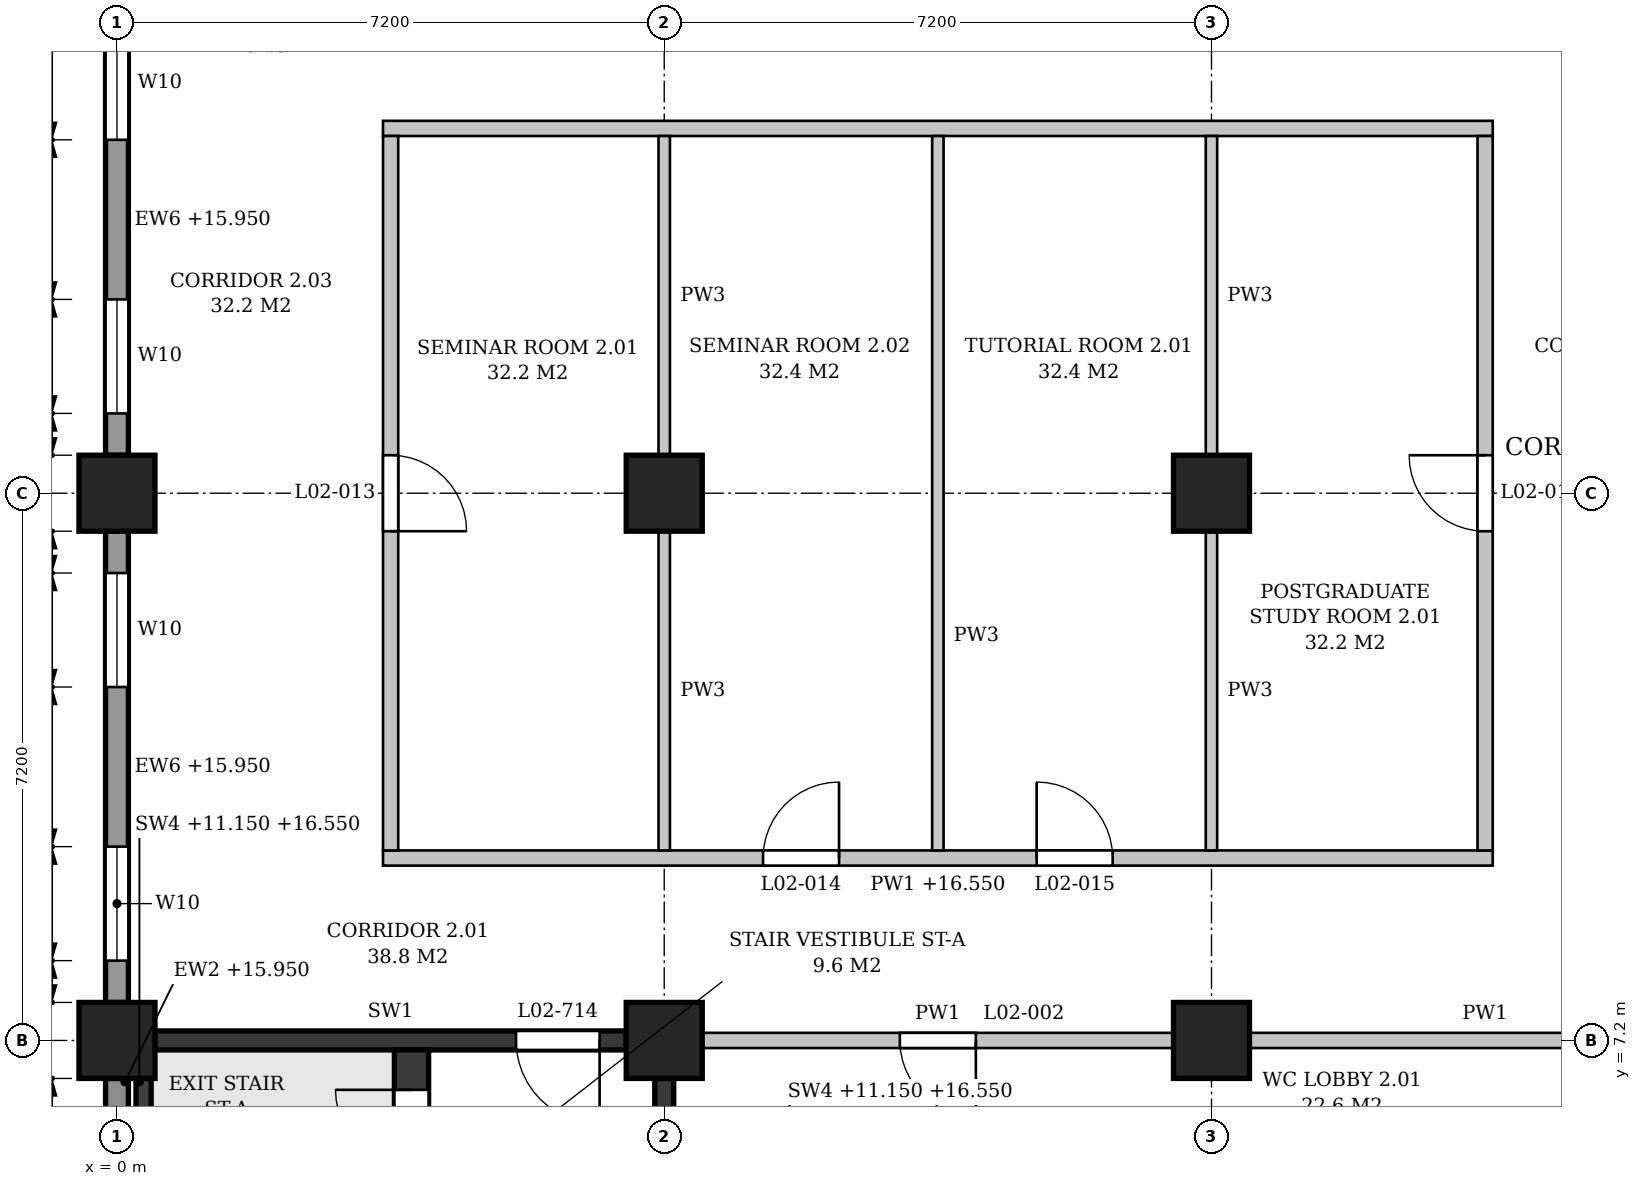
"""IFC4 building model, lengths in metres.
Left out: names, types, materials, properties, quantities, classifications, styles, units other than length and angle.
Written with IfcOpenShell. Run it as: python <this file> out.ifc"""

import sys

from ifc_helpers import new_model, si_unit, direction, frame, frame_2d, origin, origin_2d, place, context, subcontext, project, spatial, polyline, rectangle, outline, extrude, element, fill, save


model = new_model("IFC4")
c1 = context("Model", 3, precision=1e-05, world=origin(), true_north=direction((0.0, 1.0)))
c2 = subcontext(c1, "Body", "Model", "MODEL_VIEW")
j1 = project(units=[si_unit("LENGTHUNIT", "METRE"), si_unit("PLANEANGLEUNIT", "RADIAN")], contexts=[c1])
p1 = place(None, origin())
s1 = spatial("IfcSite", under=j1, at=p1, CompositionType="ELEMENT")
p2 = place(p1, origin())
s2 = spatial("IfcBuilding", under=s1, at=p2, CompositionType="ELEMENT")
p3 = place(p2, frame((0.0, 0.0, 11.4)))
s3 = spatial("IfcBuildingStorey", under=s2, at=p3, CompositionType="ELEMENT", Elevation=11.4)
for number, where, z_axis, x_axis in (
    (1, (0.0, 7.2, 0.0), (0.0, 0.0, 1.0), (1.0, 0.0, 0.0)),
    (2, (0.0, 14.4, 0.0), (0.0, 0.0, 1.0), (1.0, 0.0, 0.0)),
    (3, (7.2, 7.2, 0.0), (0.0, 0.0, 1.0), (1.0, 0.0, 0.0)),
    (4, (7.2, 14.4, 0.0), (0.0, 0.0, 1.0), (1.0, 0.0, 0.0)),
    (5, (14.4, 7.2, 0.0), (0.0, 0.0, 1.0), (1.0, 0.0, 0.0)),
    (6, (14.4, 14.4, 0.0), (0.0, 0.0, 1.0), (1.0, 0.0, 0.0)),
):
    element("IfcColumn", number, at=place(p3, frame(where, z_axis=z_axis, x_axis=x_axis)), inside=s3, PredefinedType="COLUMN", context=c2, shape_type="SweptSolid", body=[
        extrude(rectangle(XDim=1.0, YDim=1.0, at=origin_2d()), origin(), (0.0, 0.0, 1.0), 5.4),
    ])
p4 = place(p3, frame((0.0, 0.5, 0.0), z_axis=(0.0, 0.0, 1.0), x_axis=(0.0, 1.0, 0.0)))
e7 = element("IfcWall", 7, at=p4, inside=s3, PredefinedType="STANDARD", context=c2, shape_type="SweptSolid", body=[
    extrude(rectangle(XDim=6.2, YDim=0.3, at=frame_2d((3.1, 0.0))), origin(), (0.0, 0.0, 1.0), 4.55),
])
p5 = place(p4, frame((0.85, 0.0, 0.9)))
e8 = element("IfcOpeningElement", 8, at=p5, cuts=e7, PredefinedType="OPENING", context=c2, shape_type="SweptSolid", body=[
    extrude(outline(polyline([(0.0, 0.0), (0.9, 0.0), (0.9, 2.65), (0.45, 3.1), (0.0, 2.65), (0.0, 0.0)])), frame((0.0, 0.16, 0.0), z_axis=(0.0, -1.0, 0.0), x_axis=(1.0, 0.0, 0.0)), (0.0, 0.0, 1.0), 0.32),
])
p6 = place(p4, frame((4.45, 0.0, 0.9)))
e9 = element("IfcOpeningElement", 9, at=p6, cuts=e7, PredefinedType="OPENING", context=c2, shape_type="SweptSolid", body=[
    extrude(outline(polyline([(0.0, 0.0), (0.9, 0.0), (0.9, 2.65), (0.45, 3.1), (0.0, 2.65), (0.0, 0.0)])), frame((0.0, 0.16, 0.0), z_axis=(0.0, -1.0, 0.0), x_axis=(1.0, 0.0, 0.0)), (0.0, 0.0, 1.0), 0.32),
])
p7 = place(p3, frame((0.0, 7.7, 0.0), z_axis=(0.0, 0.0, 1.0), x_axis=(0.0, 1.0, 0.0)))
e10 = element("IfcWall", 10, at=p7, inside=s3, PredefinedType="STANDARD", context=c2, shape_type="SweptSolid", body=[
    extrude(rectangle(XDim=6.2, YDim=0.3, at=frame_2d((3.1, 0.0))), origin(), (0.0, 0.0, 1.0), 4.55),
])
p8 = place(p7, frame((0.55, 0.0, 0.9)))
e11 = element("IfcOpeningElement", 11, at=p8, cuts=e10, PredefinedType="OPENING", context=c2, shape_type="SweptSolid", body=[
    extrude(outline(polyline([(0.0, 0.0), (1.5, 0.0), (1.5, 2.35), (0.75, 3.1), (0.0, 2.35), (0.0, 0.0)])), frame((0.0, 0.16, 0.0), z_axis=(0.0, -1.0, 0.0), x_axis=(1.0, 0.0, 0.0)), (0.0, 0.0, 1.0), 0.32),
])
p9 = place(p7, frame((4.15, 0.0, 0.9)))
e12 = element("IfcOpeningElement", 12, at=p9, cuts=e10, PredefinedType="OPENING", context=c2, shape_type="SweptSolid", body=[
    extrude(outline(polyline([(0.0, 0.0), (1.5, 0.0), (1.5, 2.35), (0.75, 3.1), (0.0, 2.35), (0.0, 0.0)])), frame((0.0, 0.16, 0.0), z_axis=(0.0, -1.0, 0.0), x_axis=(1.0, 0.0, 0.0)), (0.0, 0.0, 1.0), 0.32),
])
p10 = place(p3, frame((0.0, 14.9, 0.0), z_axis=(0.0, 0.0, 1.0), x_axis=(0.0, 1.0, 0.0)))
e13 = element("IfcWall", 13, at=p10, inside=s3, PredefinedType="STANDARD", context=c2, shape_type="SweptSolid", body=[
    extrude(rectangle(XDim=6.2, YDim=0.3, at=frame_2d((3.1, 0.0))), origin(), (0.0, 0.0, 1.0), 4.55),
])
p11 = place(p10, frame((0.55, 0.0, 0.9)))
e14 = element("IfcOpeningElement", 14, at=p11, cuts=e13, PredefinedType="OPENING", context=c2, shape_type="SweptSolid", body=[
    extrude(outline(polyline([(0.0, 0.0), (1.5, 0.0), (1.5, 2.35), (0.75, 3.1), (0.0, 2.35), (0.0, 0.0)])), frame((0.0, 0.16, 0.0), z_axis=(0.0, -1.0, 0.0), x_axis=(1.0, 0.0, 0.0)), (0.0, 0.0, 1.0), 0.32),
])
p12 = place(p10, frame((4.15, 0.0, 0.9)))
e15 = element("IfcOpeningElement", 15, at=p12, cuts=e13, PredefinedType="OPENING", context=c2, shape_type="SweptSolid", body=[
    extrude(outline(polyline([(0.0, 0.0), (1.5, 0.0), (1.5, 2.35), (0.75, 3.1), (0.0, 2.35), (0.0, 0.0)])), frame((0.0, 0.16, 0.0), z_axis=(0.0, -1.0, 0.0), x_axis=(1.0, 0.0, 0.0)), (0.0, 0.0, 1.0), 0.32),
])
p13 = place(p3, frame((0.5, 7.2, 0.0), z_axis=(0.0, 0.0, 1.0), x_axis=(1.0, 0.0, 0.0)))
e16 = element("IfcWall", 16, at=p13, inside=s3, PredefinedType="SHEAR", context=c2, shape_type="SweptSolid", body=[
    extrude(rectangle(XDim=6.2, YDim=0.25, at=frame_2d((3.1, 0.0))), origin(), (0.0, 0.0, 1.0), 4.4),
])
p14 = place(p13, frame((4.75, 0.0, 0.0)))
e17 = element("IfcOpeningElement", 17, at=p14, cuts=e16, PredefinedType="OPENING", context=c2, shape_type="SweptSolid", body=[
    extrude(rectangle(XDim=1.1, YDim=2.1, at=frame_2d((0.55, 1.05))), frame((0.0, 0.135, 0.0), z_axis=(0.0, -1.0, 0.0), x_axis=(1.0, 0.0, 0.0)), (0.0, 0.0, 1.0), 0.27),
])
p15 = place(p3, frame((7.2, 0.5, 0.0), z_axis=(0.0, 0.0, 1.0), x_axis=(0.0, 1.0, 0.0)))
e18 = element("IfcWall", 18, at=p15, inside=s3, PredefinedType="SHEAR", context=c2, shape_type="SweptSolid", body=[
    extrude(rectangle(XDim=6.2, YDim=0.25, at=frame_2d((3.1, 0.0))), origin(), (0.0, 0.0, 1.0), 4.4),
])
p16 = place(p3, frame((0.35, 5.85, -0.25), z_axis=(0.0, 0.0, 1.0), x_axis=(0.0, 1.0, 0.0)))
e19 = element("IfcWall", 19, at=p16, inside=s3, PredefinedType="SHEAR", context=c2, shape_type="SweptSolid", body=[
    extrude(rectangle(XDim=0.85, YDim=0.2, at=frame_2d((0.425, 0.0))), origin(), (0.0, 0.0, 1.0), 5.4),
])
p17 = place(p3, frame((3.875, 0.225, 0.0), z_axis=(0.0, 0.0, 1.0), x_axis=(0.0, 1.0, 0.0)))
e20 = element("IfcWall", 20, at=p17, inside=s3, PredefinedType="SHEAR", context=c2, shape_type="SweptSolid", body=[
    extrude(rectangle(XDim=6.85, YDim=0.45, at=frame_2d((3.425, 0.0))), origin(), (0.0, 0.0, 1.0), 5.15),
])
p18 = place(p17, frame((5.325, 0.0, 0.0)))
e21 = element("IfcOpeningElement", 21, at=p18, cuts=e20, PredefinedType="OPENING", context=c2, shape_type="SweptSolid", body=[
    extrude(rectangle(XDim=1.0, YDim=2.1, at=frame_2d((0.5, 1.05))), frame((0.0, 0.235, 0.0), z_axis=(0.0, -1.0, 0.0), x_axis=(1.0, 0.0, 0.0)), (0.0, 0.0, 1.0), 0.47),
])
p19 = place(p3, frame((7.7, 7.2, 0.0), z_axis=(0.0, 0.0, 1.0), x_axis=(1.0, 0.0, 0.0)))
e22 = element("IfcWall", 22, at=p19, inside=s3, PredefinedType="PARTITIONING", context=c2, shape_type="SweptSolid", body=[
    extrude(rectangle(XDim=6.2, YDim=0.2, at=frame_2d((3.1, 0.0))), origin(), (0.0, 0.0, 1.0), 4.4),
])
p20 = place(p19, frame((2.6, 0.0, 0.0)))
e23 = element("IfcOpeningElement", 23, at=p20, cuts=e22, PredefinedType="OPENING", context=c2, shape_type="SweptSolid", body=[
    extrude(rectangle(XDim=1.0, YDim=2.1, at=frame_2d((0.5, 1.05))), frame((0.0, 0.11, 0.0), z_axis=(0.0, -1.0, 0.0), x_axis=(1.0, 0.0, 0.0)), (0.0, 0.0, 1.0), 0.22),
])
p21 = place(p3, frame((14.9, 7.2, 0.0), z_axis=(0.0, 0.0, 1.0), x_axis=(1.0, 0.0, 0.0)))
e24 = element("IfcWall", 24, at=p21, inside=s3, PredefinedType="PARTITIONING", context=c2, shape_type="SweptSolid", body=[
    extrude(rectangle(XDim=6.2, YDim=0.2, at=frame_2d((3.1, 0.0))), origin(), (0.0, 0.0, 1.0), 4.4),
])
p22 = place(p21, frame((4.15, 0.0, 0.0)))
e25 = element("IfcOpeningElement", 25, at=p22, cuts=e24, PredefinedType="OPENING", context=c2, shape_type="SweptSolid", body=[
    extrude(rectangle(XDim=1.0, YDim=2.1, at=frame_2d((0.5, 1.05))), frame((0.0, 0.11, 0.0), z_axis=(0.0, -1.0, 0.0), x_axis=(1.0, 0.0, 0.0)), (0.0, 0.0, 1.0), 0.22),
])
p23 = place(p3, frame((3.5, 9.6, 0.0), z_axis=(0.0, 0.0, 1.0), x_axis=(1.0, 0.0, 0.0)))
e26 = element("IfcWall", 26, at=p23, inside=s3, PredefinedType="PARTITIONING", context=c2, shape_type="SweptSolid", body=[
    extrude(outline(polyline([(0.0, 0.0), (14.6, 0.0), (14.6, 5.15), (11.15, 5.15), (11.15, 4.4), (10.65, 4.4), (10.65, 5.15), (3.95, 5.15), (3.95, 4.4), (3.45, 4.4), (3.45, 5.15), (0.0, 5.15), (0.0, 0.0)])), frame((0.0, 0.1, 0.0), z_axis=(0.0, -1.0, 0.0), x_axis=(1.0, 0.0, 0.0)), (0.0, 0.0, 1.0), 0.2),
])
p24 = place(p23, frame((5.0, 0.0, 0.0)))
e27 = element("IfcOpeningElement", 27, at=p24, cuts=e26, PredefinedType="OPENING", context=c2, shape_type="SweptSolid", body=[
    extrude(rectangle(XDim=1.0, YDim=2.1, at=frame_2d((0.5, 1.05))), frame((0.0, 0.11, 0.0), z_axis=(0.0, -1.0, 0.0), x_axis=(1.0, 0.0, 0.0)), (0.0, 0.0, 1.0), 0.22),
])
p25 = place(p23, frame((8.6, 0.0, 0.0)))
e28 = element("IfcOpeningElement", 28, at=p25, cuts=e26, PredefinedType="OPENING", context=c2, shape_type="SweptSolid", body=[
    extrude(rectangle(XDim=1.0, YDim=2.1, at=frame_2d((0.5, 1.05))), frame((0.0, 0.11, 0.0), z_axis=(0.0, -1.0, 0.0), x_axis=(1.0, 0.0, 0.0)), (0.0, 0.0, 1.0), 0.22),
])
p26 = place(p3, frame((3.5, 19.2, 0.0), z_axis=(0.0, 0.0, 1.0), x_axis=(1.0, 0.0, 0.0)))
e29 = element("IfcWall", 29, at=p26, inside=s3, PredefinedType="PARTITIONING", context=c2, shape_type="SweptSolid", body=[
    extrude(outline(polyline([(0.0, 0.0), (14.6, 0.0), (14.6, 5.15), (11.15, 5.15), (11.15, 4.4), (10.65, 4.4), (10.65, 5.15), (3.95, 5.15), (3.95, 4.4), (3.45, 4.4), (3.45, 5.15), (0.0, 5.15), (0.0, 0.0)])), frame((0.0, 0.1, 0.0), z_axis=(0.0, -1.0, 0.0), x_axis=(1.0, 0.0, 0.0)), (0.0, 0.0, 1.0), 0.2),
])
p27 = place(p3, frame((3.6, 9.7, 0.0), z_axis=(0.0, 0.0, 1.0), x_axis=(0.0, 1.0, 0.0)))
e30 = element("IfcWall", 30, at=p27, inside=s3, PredefinedType="PARTITIONING", context=c2, shape_type="SweptSolid", body=[
    extrude(outline(polyline([(0.0, 0.0), (9.4, 0.0), (9.4, 5.15), (4.95, 5.15), (4.95, 4.4), (4.45, 4.4), (4.45, 5.15), (0.0, 5.15), (0.0, 0.0)])), frame((0.0, 0.1, 0.0), z_axis=(0.0, -1.0, 0.0), x_axis=(1.0, 0.0, 0.0)), (0.0, 0.0, 1.0), 0.2),
])
p28 = place(p27, frame((4.2, 0.0, 0.0)))
e31 = element("IfcOpeningElement", 31, at=p28, cuts=e30, PredefinedType="OPENING", context=c2, shape_type="SweptSolid", body=[
    extrude(rectangle(XDim=1.0, YDim=2.1, at=frame_2d((0.5, 1.05))), frame((0.0, 0.11, 0.0), z_axis=(0.0, -1.0, 0.0), x_axis=(1.0, 0.0, 0.0)), (0.0, 0.0, 1.0), 0.22),
])
p29 = place(p3, frame((7.2, 9.7, 0.0), z_axis=(0.0, 0.0, 1.0), x_axis=(0.0, 1.0, 0.0)))
e32 = element("IfcWall", 32, at=p29, inside=s3, PredefinedType="PARTITIONING", context=c2, shape_type="SweptSolid", body=[
    extrude(rectangle(XDim=4.2, YDim=0.15, at=frame_2d((2.1, 0.0))), origin(), (0.0, 0.0, 1.0), 4.4),
])
p30 = place(p3, frame((7.2, 14.9, 0.0), z_axis=(0.0, 0.0, 1.0), x_axis=(0.0, 1.0, 0.0)))
e33 = element("IfcWall", 33, at=p30, inside=s3, PredefinedType="PARTITIONING", context=c2, shape_type="SweptSolid", body=[
    extrude(rectangle(XDim=4.2, YDim=0.15, at=frame_2d((2.1, 0.0))), origin(), (0.0, 0.0, 1.0), 4.4),
])
p31 = place(p3, frame((10.8, 9.7, 0.0), z_axis=(0.0, 0.0, 1.0), x_axis=(0.0, 1.0, 0.0)))
e34 = element("IfcWall", 34, at=p31, inside=s3, PredefinedType="PARTITIONING", context=c2, shape_type="SweptSolid", body=[
    extrude(rectangle(XDim=9.4, YDim=0.15, at=frame_2d((4.7, 0.0))), origin(), (0.0, 0.0, 1.0), 4.4),
])
p32 = place(p3, frame((14.4, 9.7, 0.0), z_axis=(0.0, 0.0, 1.0), x_axis=(0.0, 1.0, 0.0)))
e35 = element("IfcWall", 35, at=p32, inside=s3, PredefinedType="PARTITIONING", context=c2, shape_type="SweptSolid", body=[
    extrude(rectangle(XDim=4.2, YDim=0.15, at=frame_2d((2.1, 0.0))), origin(), (0.0, 0.0, 1.0), 4.4),
])
p33 = place(p3, frame((14.4, 14.9, 0.0), z_axis=(0.0, 0.0, 1.0), x_axis=(0.0, 1.0, 0.0)))
e36 = element("IfcWall", 36, at=p33, inside=s3, PredefinedType="PARTITIONING", context=c2, shape_type="SweptSolid", body=[
    extrude(rectangle(XDim=4.2, YDim=0.15, at=frame_2d((2.1, 0.0))), origin(), (0.0, 0.0, 1.0), 4.4),
])
p34 = place(p3, frame((18.0, 9.7, 0.0), z_axis=(0.0, 0.0, 1.0), x_axis=(0.0, 1.0, 0.0)))
e37 = element("IfcWall", 37, at=p34, inside=s3, PredefinedType="PARTITIONING", context=c2, shape_type="SweptSolid", body=[
    extrude(outline(polyline([(0.0, 0.0), (9.4, 0.0), (9.4, 5.15), (4.95, 5.15), (4.95, 4.4), (4.45, 4.4), (4.45, 5.15), (0.0, 5.15), (0.0, 0.0)])), frame((0.0, 0.1, 0.0), z_axis=(0.0, -1.0, 0.0), x_axis=(1.0, 0.0, 0.0)), (0.0, 0.0, 1.0), 0.2),
])
p35 = place(p34, frame((4.2, 0.0, 0.0)))
e38 = element("IfcOpeningElement", 38, at=p35, cuts=e37, PredefinedType="OPENING", context=c2, shape_type="SweptSolid", body=[
    extrude(rectangle(XDim=1.0, YDim=2.1, at=frame_2d((0.5, 1.05))), frame((0.0, 0.11, 0.0), z_axis=(0.0, -1.0, 0.0), x_axis=(1.0, 0.0, 0.0)), (0.0, 0.0, 1.0), 0.22),
])
p36 = place(p8, origin())
e39 = element("IfcWindow", 39, at=p36, inside=s3, PartitioningType="SINGLE_PANEL", PredefinedType="WINDOW", context=c2, shape_type="SweptSolid", body=[
    extrude(outline(polyline([(0.0, 0.0), (1.5, 0.0), (1.5, 2.35), (0.75, 3.1), (0.0, 2.35), (0.0, 0.0)])), frame((0.0, 0.03, 0.0), z_axis=(0.0, -1.0, 0.0), x_axis=(1.0, 0.0, 0.0)), (0.0, 0.0, 1.0), 0.06),
])
fill(e11, e39)
p37 = place(p9, origin())
e40 = element("IfcWindow", 40, at=p37, inside=s3, PartitioningType="SINGLE_PANEL", PredefinedType="WINDOW", context=c2, shape_type="SweptSolid", body=[
    extrude(outline(polyline([(0.0, 0.0), (1.5, 0.0), (1.5, 2.35), (0.75, 3.1), (0.0, 2.35), (0.0, 0.0)])), frame((0.0, 0.03, 0.0), z_axis=(0.0, -1.0, 0.0), x_axis=(1.0, 0.0, 0.0)), (0.0, 0.0, 1.0), 0.06),
])
fill(e12, e40)
p38 = place(p11, origin())
e41 = element("IfcWindow", 41, at=p38, inside=s3, PartitioningType="SINGLE_PANEL", PredefinedType="WINDOW", context=c2, shape_type="SweptSolid", body=[
    extrude(outline(polyline([(0.0, 0.0), (1.5, 0.0), (1.5, 2.35), (0.75, 3.1), (0.0, 2.35), (0.0, 0.0)])), frame((0.0, 0.03, 0.0), z_axis=(0.0, -1.0, 0.0), x_axis=(1.0, 0.0, 0.0)), (0.0, 0.0, 1.0), 0.06),
])
fill(e14, e41)
p39 = place(p12, origin())
e42 = element("IfcWindow", 42, at=p39, inside=s3, PartitioningType="SINGLE_PANEL", PredefinedType="WINDOW", context=c2, shape_type="SweptSolid", body=[
    extrude(outline(polyline([(0.0, 0.0), (1.5, 0.0), (1.5, 2.35), (0.75, 3.1), (0.0, 2.35), (0.0, 0.0)])), frame((0.0, 0.03, 0.0), z_axis=(0.0, -1.0, 0.0), x_axis=(1.0, 0.0, 0.0)), (0.0, 0.0, 1.0), 0.06),
])
fill(e15, e42)
p40 = place(p18, origin())
e43 = element("IfcDoor", 43, at=p40, inside=s3, OperationType="SINGLE_SWING_RIGHT", PredefinedType="DOOR", context=c2, shape_type="SweptSolid", body=[
    extrude(rectangle(XDim=1.0, YDim=2.1, at=frame_2d((0.5, 1.05))), frame((0.0, 0.025, 0.0), z_axis=(0.0, -1.0, 0.0), x_axis=(1.0, 0.0, 0.0)), (0.0, 0.0, 1.0), 0.05),
])
fill(e21, e43)
p41 = place(p14, frame((1.1, 0.0, 0.0), z_axis=(0.0, 0.0, 1.0), x_axis=(-1.0, 0.0, 0.0)))
e44 = element("IfcDoor", 44, at=p41, inside=s3, OperationType="SINGLE_SWING_LEFT", PredefinedType="DOOR", context=c2, shape_type="SweptSolid", body=[
    extrude(rectangle(XDim=1.1, YDim=2.1, at=frame_2d((0.55, 1.05))), frame((0.0, 0.025, 0.0), z_axis=(0.0, -1.0, 0.0), x_axis=(1.0, 0.0, 0.0)), (0.0, 0.0, 1.0), 0.05),
])
fill(e17, e44)
p42 = place(p20, frame((1.0, 0.0, 0.0), z_axis=(0.0, 0.0, 1.0), x_axis=(-1.0, 0.0, 0.0)))
e45 = element("IfcDoor", 45, at=p42, inside=s3, OperationType="SINGLE_SWING_LEFT", PredefinedType="DOOR", context=c2, shape_type="SweptSolid", body=[
    extrude(rectangle(XDim=1.0, YDim=2.1, at=frame_2d((0.5, 1.05))), frame((0.0, 0.025, 0.0), z_axis=(0.0, -1.0, 0.0), x_axis=(1.0, 0.0, 0.0)), (0.0, 0.0, 1.0), 0.05),
])
fill(e23, e45)
p43 = place(p28, frame((1.0, 0.0, 0.0), z_axis=(0.0, 0.0, 1.0), x_axis=(-1.0, 0.0, 0.0)))
e46 = element("IfcDoor", 46, at=p43, inside=s3, OperationType="SINGLE_SWING_RIGHT", PredefinedType="DOOR", context=c2, shape_type="SweptSolid", body=[
    extrude(rectangle(XDim=1.0, YDim=2.1, at=frame_2d((0.5, 1.05))), frame((0.0, 0.025, 0.0), z_axis=(0.0, -1.0, 0.0), x_axis=(1.0, 0.0, 0.0)), (0.0, 0.0, 1.0), 0.05),
])
fill(e31, e46)
p44 = place(p24, origin())
e47 = element("IfcDoor", 47, at=p44, inside=s3, OperationType="SINGLE_SWING_RIGHT", PredefinedType="DOOR", context=c2, shape_type="SweptSolid", body=[
    extrude(rectangle(XDim=1.0, YDim=2.1, at=frame_2d((0.5, 1.05))), frame((0.0, 0.025, 0.0), z_axis=(0.0, -1.0, 0.0), x_axis=(1.0, 0.0, 0.0)), (0.0, 0.0, 1.0), 0.05),
])
fill(e27, e47)
p45 = place(p25, origin())
e48 = element("IfcDoor", 48, at=p45, inside=s3, OperationType="SINGLE_SWING_LEFT", PredefinedType="DOOR", context=c2, shape_type="SweptSolid", body=[
    extrude(rectangle(XDim=1.0, YDim=2.1, at=frame_2d((0.5, 1.05))), frame((0.0, 0.025, 0.0), z_axis=(0.0, -1.0, 0.0), x_axis=(1.0, 0.0, 0.0)), (0.0, 0.0, 1.0), 0.05),
])
fill(e28, e48)
p46 = place(p35, origin())
e49 = element("IfcDoor", 49, at=p46, inside=s3, OperationType="SINGLE_SWING_RIGHT", PredefinedType="DOOR", context=c2, shape_type="SweptSolid", body=[
    extrude(rectangle(XDim=1.0, YDim=2.1, at=frame_2d((0.5, 1.05))), frame((0.0, 0.025, 0.0), z_axis=(0.0, -1.0, 0.0), x_axis=(1.0, 0.0, 0.0)), (0.0, 0.0, 1.0), 0.05),
])
fill(e38, e49)
save(model, sys.argv[1])
